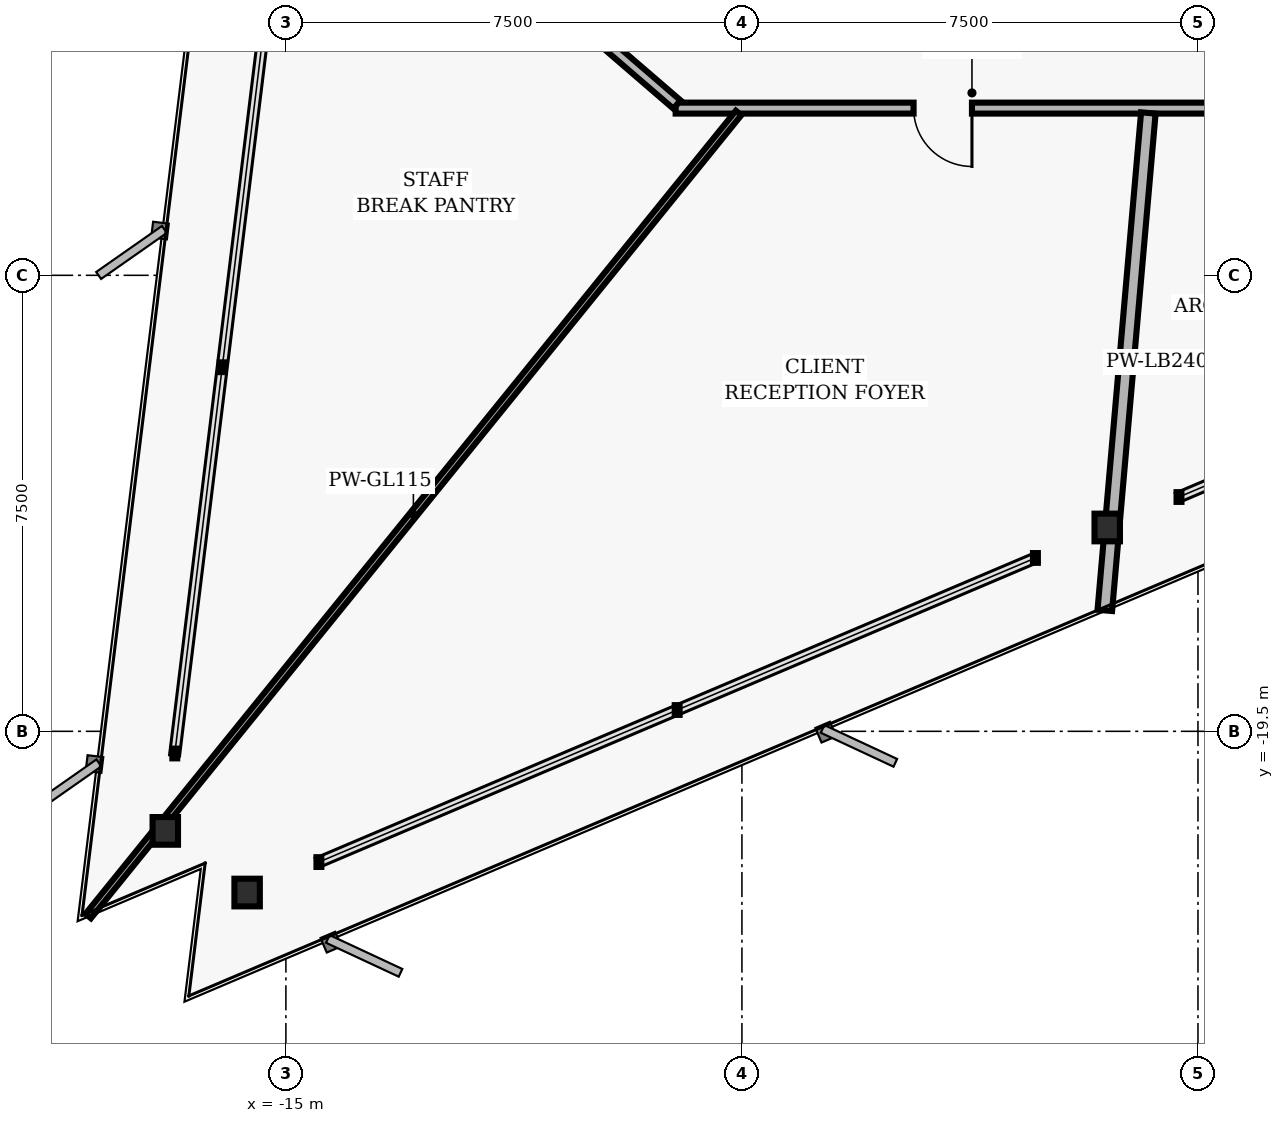
"""IFC4 building model, lengths in metres.
Left out: names, types, materials, properties, quantities, classifications, styles, units other than length and angle.
Written with IfcOpenShell. Run it as: python <this file> out.ifc"""

import sys

from ifc_helpers import new_model, si_unit, direction, frame, frame_2d, origin, origin_2d, place, context, subcontext, project, spatial, rectangle, i_section, extrude, element, fill, save


model = new_model("IFC4")
c1 = context("Model", 3, precision=1e-05, world=origin(), true_north=direction((0.0, 1.0)))
c2 = subcontext(c1, "Body", "Model", "MODEL_VIEW")
j1 = project(units=[si_unit("LENGTHUNIT", "METRE"), si_unit("PLANEANGLEUNIT", "RADIAN")], contexts=[c1])
p1 = place(None, origin())
s1 = spatial("IfcSite", under=j1, at=p1, CompositionType="ELEMENT")
p2 = place(p1, origin())
s2 = spatial("IfcBuilding", under=s1, at=p2, CompositionType="ELEMENT")
p3 = place(p2, frame((0.0, 0.0, 66.4)))
s3 = spatial("IfcBuildingStorey", under=s2, at=p3, CompositionType="ELEMENT", Elevation=66.4)
for number, where, z_axis, x_axis in (
    (1, (-16.983, -21.138, 0.0), (0.0, 0.0, 1.0), (1.0, 0.0, 0.0)),
    (2, (-15.638, -22.152, 0.0), (0.0, 0.0, 1.0), (1.0, 0.0, 0.0)),
    (3, (-1.493, -16.148, 0.0), (0.0, 0.0, 1.0), (1.0, 0.0, 0.0)),
):
    element("IfcColumn", number, at=place(p3, frame(where, z_axis=z_axis, x_axis=x_axis)), inside=s3, PredefinedType="COLUMN", context=c2, shape_type="SweptSolid", body=[
        extrude(i_section(OverallWidth=0.418, OverallDepth=0.455, WebThickness=0.042, FlangeThickness=0.068, FilletRadius=0.025, at=origin_2d()), origin(), (0.0, 0.0, 1.0), 3.36),
    ])
p4 = place(p3, frame((8.41, -9.25, 0.0), z_axis=(0.0, 0.0, 1.0), x_axis=(-1.0, 0.0, 0.0)))
e4 = element("IfcWall", 4, at=p4, inside=s3, PredefinedType="PARTITIONING", context=c2, shape_type="SweptSolid", body=[
    extrude(rectangle(XDim=17.0, YDim=0.18, at=frame_2d((8.5, 0.0))), origin(), (0.0, 0.0, 1.0), 2.587),
])
p5 = place(p4, frame((12.127, 0.0, 0.0)))
e5 = element("IfcOpeningElement", 5, at=p5, cuts=e4, PredefinedType="OPENING", context=c2, shape_type="SweptSolid", body=[
    extrude(rectangle(XDim=0.96, YDim=2.02, at=frame_2d((0.48, 1.01))), frame((0.0, 0.1, 0.0), z_axis=(0.0, -1.0, 0.0), x_axis=(1.0, 0.0, 0.0)), (0.0, 0.0, 1.0), 0.2),
])
p6 = place(p4, frame((5.75, 0.0, 0.0)))
e6 = element("IfcOpeningElement", 6, at=p6, cuts=e4, PredefinedType="OPENING", context=c2, shape_type="SweptSolid", body=[
    extrude(rectangle(XDim=0.96, YDim=2.02, at=frame_2d((0.48, 1.01))), frame((0.0, 0.1, 0.0), z_axis=(0.0, -1.0, 0.0), x_axis=(1.0, 0.0, 0.0)), (0.0, 0.0, 1.0), 0.2),
])
p7 = place(p3, frame((-8.568, -9.191, 0.0), z_axis=(0.0, 0.0, 1.0), x_axis=(-0.757556899173, 0.652769135694, 0.0)))
e7 = element("IfcWall", 7, at=p7, inside=s3, PredefinedType="PARTITIONING", context=c2, shape_type="SweptSolid", body=[
    extrude(rectangle(XDim=6.204, YDim=0.18, at=frame_2d((3.102, 0.0))), origin(), (0.0, 0.0, 1.0), 3.073),
])
p8 = place(p7, frame((2.622, 0.0, 0.0)))
e8 = element("IfcOpeningElement", 8, at=p8, cuts=e7, PredefinedType="OPENING", context=c2, shape_type="SweptSolid", body=[
    extrude(rectangle(XDim=0.96, YDim=2.02, at=frame_2d((0.48, 1.01))), frame((0.0, 0.1, 0.0), z_axis=(0.0, -1.0, 0.0), x_axis=(1.0, 0.0, 0.0)), (0.0, 0.0, 1.0), 0.2),
])
p9 = place(p3, frame((-7.555, -9.33, 0.0), z_axis=(0.0, 0.0, 1.0), x_axis=(-0.629320948329, -0.777145510181, 0.0)))
e9 = element("IfcWall", 9, at=p9, inside=s3, PredefinedType="MOVABLE", context=c2, shape_type="SweptSolid", body=[
    extrude(rectangle(XDim=16.996, YDim=0.115, at=frame_2d((8.498, 0.0))), origin(), (0.0, 0.0, 1.0), 2.358),
])
p10 = place(p3, frame((-0.816, -9.33, 0.0), z_axis=(0.0, 0.0, 1.0), x_axis=(-0.087131179551, -0.996196846788, 0.0)))
e10 = element("IfcWall", 10, at=p10, inside=s3, PredefinedType="PARTITIONING", context=c2, shape_type="SweptSolid", body=[
    extrude(rectangle(XDim=8.213, YDim=0.24, at=frame_2d((4.106, 0.0))), origin(), (0.0, 0.0, 1.0), 3.073),
])
p11 = place(p5, origin())
e11 = element("IfcDoor", 11, at=p11, inside=s3, OperationType="SINGLE_SWING_LEFT", PredefinedType="DOOR", context=c2, shape_type="SweptSolid", body=[
    extrude(rectangle(XDim=0.96, YDim=2.02, at=frame_2d((0.48, 1.01))), frame((0.0, 0.025, 0.0), z_axis=(0.0, -1.0, 0.0), x_axis=(1.0, 0.0, 0.0)), (0.0, 0.0, 1.0), 0.05),
])
fill(e5, e11)
save(model, sys.argv[1])
